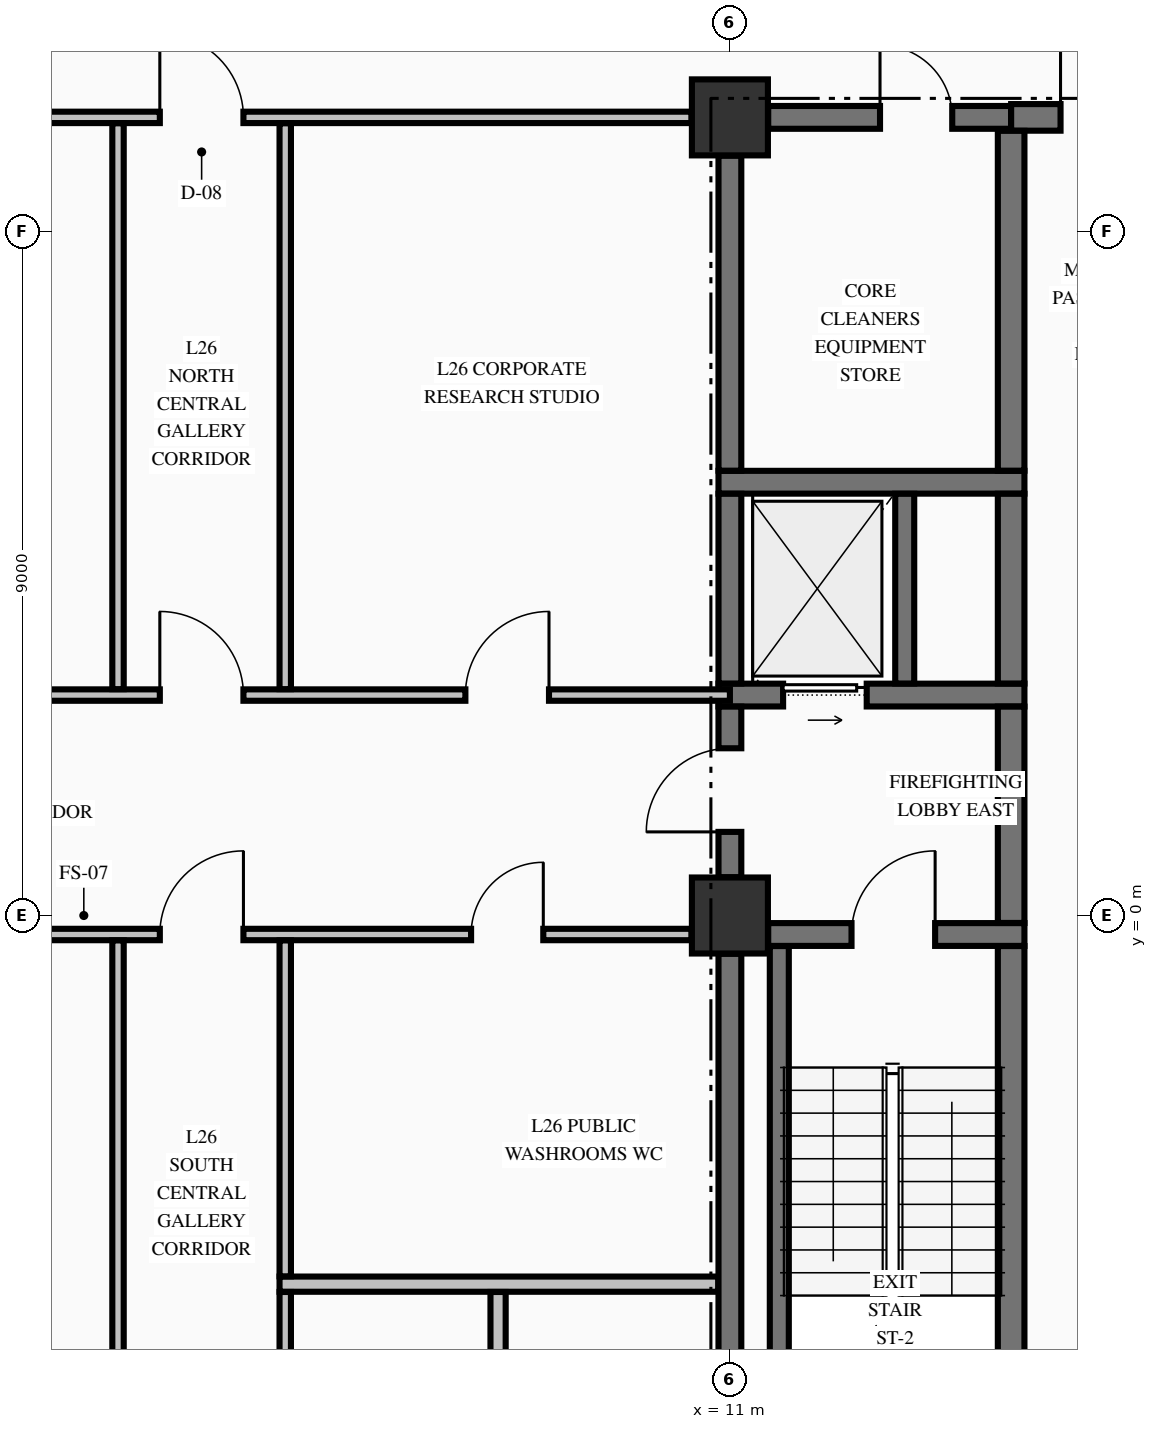
"""IFC4 building model, lengths in metres.
Left out: names, types, materials, properties, quantities, classifications, styles, units other than length and angle.
Written with IfcOpenShell. Run it as: python <this file> out.ifc"""

import sys

from ifc_helpers import new_model, si_unit, direction, frame, frame_2d, origin, origin_2d, place, context, subcontext, project, spatial, rectangle, extrude, element, fill, save


model = new_model("IFC4")
c1 = context("Model", 3, precision=1e-05, world=origin(), true_north=direction((0.0, 1.0)))
c2 = subcontext(c1, "Body", "Model", "MODEL_VIEW")
j1 = project(units=[si_unit("LENGTHUNIT", "METRE"), si_unit("PLANEANGLEUNIT", "RADIAN")], contexts=[c1])
p1 = place(None, origin())
s1 = spatial("IfcSite", under=j1, at=p1, CompositionType="ELEMENT")
p2 = place(p1, origin())
s2 = spatial("IfcBuilding", under=s1, at=p2, CompositionType="ELEMENT")
p3 = place(p2, frame((0.0, 0.0, 105.64)))
s3 = spatial("IfcBuildingStorey", under=s2, at=p3, CompositionType="ELEMENT", Elevation=105.64)
for number, where, z_axis, x_axis in (
    (1, (11.0, 0.0, -0.25), (0.0, 0.0, 1.0), (1.0, 0.0, 0.0)),
    (2, (11.0, 10.5, -0.25), (0.0, 0.0, 1.0), (1.0, 0.0, 0.0)),
):
    element("IfcColumn", number, at=place(p3, frame(where, z_axis=z_axis, x_axis=x_axis)), inside=s3, PredefinedType="COLUMN", context=c2, shape_type="SweptSolid", body=[
        extrude(rectangle(XDim=1.0, YDim=1.0, at=origin_2d()), origin(), (0.0, 0.0, 1.0), 3.57),
    ])
p4 = place(p3, frame((11.504, -0.25, 0.0), z_axis=(0.0, 0.0, 1.0), x_axis=(1.0, 0.0, 0.0)))
e3 = element("IfcWall", 3, at=p4, inside=s3, PredefinedType="SHEAR", context=c2, shape_type="SweptSolid", body=[
    extrude(rectangle(XDim=3.371, YDim=0.3, at=frame_2d((1.686, 0.0))), origin(), (0.0, 0.0, 1.0), 3.32),
])
p5 = place(p4, frame((1.096, 0.0, 0.0)))
e4 = element("IfcOpeningElement", 4, at=p5, cuts=e3, PredefinedType="OPENING", context=c2, shape_type="SweptSolid", body=[
    extrude(rectangle(XDim=1.1, YDim=2.15, at=frame_2d((0.55, 1.075))), frame((0.0, 0.16, 0.0), z_axis=(0.0, -1.0, 0.0), x_axis=(1.0, 0.0, 0.0)), (0.0, 0.0, 1.0), 0.32),
])
p6 = place(p3, frame((10.85, 2.9, 0.0), z_axis=(0.0, 0.0, 1.0), x_axis=(1.0, 0.0, 0.0)))
e5 = element("IfcWall", 5, at=p6, inside=s3, PredefinedType="SHEAR", context=c2, shape_type="SweptSolid", body=[
    extrude(rectangle(XDim=4.025, YDim=0.3, at=frame_2d((2.012, 0.0))), origin(), (0.0, 0.0, 1.0), 3.32),
])
p7 = place(p6, frame((0.85, 0.0, 0.0)))
e6 = element("IfcOpeningElement", 6, at=p7, cuts=e5, PredefinedType="OPENING", context=c2, shape_type="SweptSolid", body=[
    extrude(rectangle(XDim=1.1, YDim=2.2, at=frame_2d((0.55, 1.1))), frame((0.0, 0.16, 0.0), z_axis=(0.0, -1.0, 0.0), x_axis=(1.0, 0.0, 0.0)), (0.0, 0.0, 1.0), 0.32),
])
p8 = place(p3, frame((10.85, 5.7, 0.0), z_axis=(0.0, 0.0, 1.0), x_axis=(1.0, 0.0, 0.0)))
e7 = element("IfcWall", 7, at=p8, inside=s3, PredefinedType="SHEAR", context=c2, shape_type="SweptSolid", body=[
    extrude(rectangle(XDim=4.025, YDim=0.3, at=frame_2d((2.012, 0.0))), origin(), (0.0, 0.0, 1.0), 3.32),
])
p9 = place(p3, frame((11.504, 10.5, 0.0), z_axis=(0.0, 0.0, 1.0), x_axis=(1.0, 0.0, 0.0)))
e8 = element("IfcWall", 8, at=p9, inside=s3, PredefinedType="SHEAR", context=c2, shape_type="SweptSolid", body=[
    extrude(rectangle(XDim=3.196, YDim=0.3, at=frame_2d((1.598, 0.0))), origin(), (0.0, 0.0, 1.0), 3.32),
])
p10 = place(p9, frame((1.471, 0.0, 0.0)))
e9 = element("IfcOpeningElement", 9, at=p10, cuts=e8, PredefinedType="OPENING", context=c2, shape_type="SweptSolid", body=[
    extrude(rectangle(XDim=0.95, YDim=2.15, at=frame_2d((0.475, 1.075))), frame((0.0, 0.16, 0.0), z_axis=(0.0, -1.0, 0.0), x_axis=(1.0, 0.0, 0.0)), (0.0, 0.0, 1.0), 0.32),
])
p11 = place(p3, frame((14.7, 10.5, 0.0), z_axis=(0.0, 0.0, 1.0), x_axis=(1.0, 0.0, 0.0)))
e10 = element("IfcWall", 10, at=p11, inside=s3, PredefinedType="SHEAR", context=c2, shape_type="SweptSolid", body=[
    extrude(rectangle(XDim=4.796, YDim=0.35, at=frame_2d((2.398, 0.0))), origin(), (0.0, 0.0, 1.0), 3.32),
])
p12 = place(p11, frame((0.65, 0.0, 0.0)))
e11 = element("IfcOpeningElement", 11, at=p12, cuts=e10, PredefinedType="OPENING", context=c2, shape_type="SweptSolid", body=[
    extrude(rectangle(XDim=1.2, YDim=2.15, at=frame_2d((0.6, 1.075))), frame((0.0, 0.185, 0.0), z_axis=(0.0, -1.0, 0.0), x_axis=(1.0, 0.0, 0.0)), (0.0, 0.0, 1.0), 0.37),
])
p13 = place(p11, frame((3.25, 0.0, 0.0)))
e12 = element("IfcOpeningElement", 12, at=p13, cuts=e10, PredefinedType="OPENING", context=c2, shape_type="SweptSolid", body=[
    extrude(rectangle(XDim=0.9, YDim=2.15, at=frame_2d((0.45, 1.075))), frame((0.0, 0.185, 0.0), z_axis=(0.0, -1.0, 0.0), x_axis=(1.0, 0.0, 0.0)), (0.0, 0.0, 1.0), 0.37),
])
p14 = place(p3, frame((5.075, -4.85, 0.0), z_axis=(0.0, 0.0, 1.0), x_axis=(1.0, 0.0, 0.0)))
e13 = element("IfcWall", 13, at=p14, inside=s3, PredefinedType="PARTITIONING", context=c2, shape_type="SweptSolid", body=[
    extrude(rectangle(XDim=5.772, YDim=0.2, at=frame_2d((2.886, 0.0))), origin(), (0.0, 0.0, 1.0), 3.32),
])
p15 = place(p3, frame((-10.494, -0.25, 0.0), z_axis=(0.0, 0.0, 1.0), x_axis=(1.0, 0.0, 0.0)))
e14 = element("IfcWall", 14, at=p15, inside=s3, PredefinedType="PARTITIONING", context=c2, shape_type="SweptSolid", body=[
    extrude(rectangle(XDim=20.988, YDim=0.15, at=frame_2d((10.494, 0.0))), origin(), (0.0, 0.0, 1.0), 3.32),
])
p16 = place(p15, frame((13.994, 0.0, 0.0)))
e15 = element("IfcOpeningElement", 15, at=p16, cuts=e14, PredefinedType="OPENING", context=c2, shape_type="SweptSolid", body=[
    extrude(rectangle(XDim=1.1, YDim=2.15, at=frame_2d((0.55, 1.075))), frame((0.0, 0.085, 0.0), z_axis=(0.0, -1.0, 0.0), x_axis=(1.0, 0.0, 0.0)), (0.0, 0.0, 1.0), 0.17),
])
p17 = place(p15, frame((5.939, 0.0, 0.0)))
e16 = element("IfcOpeningElement", 16, at=p17, cuts=e14, PredefinedType="OPENING", context=c2, shape_type="SweptSolid", body=[
    extrude(rectangle(XDim=1.05, YDim=2.15, at=frame_2d((0.525, 1.075))), frame((0.0, 0.085, 0.0), z_axis=(0.0, -1.0, 0.0), x_axis=(1.0, 0.0, 0.0)), (0.0, 0.0, 1.0), 0.17),
])
p18 = place(p15, frame((18.089, 0.0, 0.0)))
e17 = element("IfcOpeningElement", 17, at=p18, cuts=e14, PredefinedType="OPENING", context=c2, shape_type="SweptSolid", body=[
    extrude(rectangle(XDim=0.95, YDim=2.15, at=frame_2d((0.475, 1.075))), frame((0.0, 0.085, 0.0), z_axis=(0.0, -1.0, 0.0), x_axis=(1.0, 0.0, 0.0)), (0.0, 0.0, 1.0), 0.17),
])
p19 = place(p3, frame((-11.0, 2.9, 0.0), z_axis=(0.0, 0.0, 1.0), x_axis=(1.0, 0.0, 0.0)))
e18 = element("IfcWall", 18, at=p19, inside=s3, PredefinedType="PARTITIONING", context=c2, shape_type="SweptSolid", body=[
    extrude(rectangle(XDim=22.0, YDim=0.15, at=frame_2d((11.0, 0.0))), origin(), (0.0, 0.0, 1.0), 3.32),
])
p20 = place(p19, frame((14.5, 0.0, 0.0)))
e19 = element("IfcOpeningElement", 19, at=p20, cuts=e18, PredefinedType="OPENING", context=c2, shape_type="SweptSolid", body=[
    extrude(rectangle(XDim=1.1, YDim=2.15, at=frame_2d((0.55, 1.075))), frame((0.0, 0.085, 0.0), z_axis=(0.0, -1.0, 0.0), x_axis=(1.0, 0.0, 0.0)), (0.0, 0.0, 1.0), 0.17),
])
p21 = place(p19, frame((6.445, 0.0, 0.0)))
e20 = element("IfcOpeningElement", 20, at=p21, cuts=e18, PredefinedType="OPENING", context=c2, shape_type="SweptSolid", body=[
    extrude(rectangle(XDim=1.05, YDim=2.15, at=frame_2d((0.525, 1.075))), frame((0.0, 0.085, 0.0), z_axis=(0.0, -1.0, 0.0), x_axis=(1.0, 0.0, 0.0)), (0.0, 0.0, 1.0), 0.17),
])
p22 = place(p19, frame((18.52, 0.0, 0.0)))
e21 = element("IfcOpeningElement", 21, at=p22, cuts=e18, PredefinedType="OPENING", context=c2, shape_type="SweptSolid", body=[
    extrude(rectangle(XDim=1.1, YDim=2.15, at=frame_2d((0.55, 1.075))), frame((0.0, 0.085, 0.0), z_axis=(0.0, -1.0, 0.0), x_axis=(1.0, 0.0, 0.0)), (0.0, 0.0, 1.0), 0.17),
])
p23 = place(p3, frame((-10.494, 10.5, 0.0), z_axis=(0.0, 0.0, 1.0), x_axis=(1.0, 0.0, 0.0)))
e22 = element("IfcWall", 22, at=p23, inside=s3, PredefinedType="PARTITIONING", context=c2, shape_type="SweptSolid", body=[
    extrude(rectangle(XDim=20.988, YDim=0.15, at=frame_2d((10.494, 0.0))), origin(), (0.0, 0.0, 1.0), 3.32),
])
p24 = place(p23, frame((13.994, 0.0, 0.0)))
e23 = element("IfcOpeningElement", 23, at=p24, cuts=e22, PredefinedType="OPENING", context=c2, shape_type="SweptSolid", body=[
    extrude(rectangle(XDim=1.1, YDim=2.15, at=frame_2d((0.55, 1.075))), frame((0.0, 0.085, 0.0), z_axis=(0.0, -1.0, 0.0), x_axis=(1.0, 0.0, 0.0)), (0.0, 0.0, 1.0), 0.17),
])
p25 = place(p3, frame((11.0, -9.446, 0.0), z_axis=(0.0, 0.0, 1.0), x_axis=(0.0, 1.0, 0.0)))
e24 = element("IfcWall", 24, at=p25, inside=s3, PredefinedType="SHEAR", context=c2, shape_type="SweptSolid", body=[
    extrude(rectangle(XDim=8.942, YDim=0.3, at=frame_2d((4.471, 0.0))), origin(), (0.0, 0.0, 1.0), 3.32),
])
p26 = place(p3, frame((11.0, 0.504, 0.0), z_axis=(0.0, 0.0, 1.0), x_axis=(0.0, 1.0, 0.0)))
e25 = element("IfcWall", 25, at=p26, inside=s3, PredefinedType="SHEAR", context=c2, shape_type="SweptSolid", body=[
    extrude(rectangle(XDim=2.244, YDim=0.3, at=frame_2d((1.122, 0.0))), origin(), (0.0, 0.0, 1.0), 3.32),
])
p27 = place(p26, frame((0.596, 0.0, 0.0)))
e26 = element("IfcOpeningElement", 26, at=p27, cuts=e25, PredefinedType="OPENING", context=c2, shape_type="SweptSolid", body=[
    extrude(rectangle(XDim=1.1, YDim=2.15, at=frame_2d((0.55, 1.075))), frame((0.0, 0.16, 0.0), z_axis=(0.0, -1.0, 0.0), x_axis=(1.0, 0.0, 0.0)), (0.0, 0.0, 1.0), 0.32),
])
p28 = place(p3, frame((11.0, 3.052, 0.0), z_axis=(0.0, 0.0, 1.0), x_axis=(0.0, 1.0, 0.0)))
e27 = element("IfcWall", 27, at=p28, inside=s3, PredefinedType="SHEAR", context=c2, shape_type="SweptSolid", body=[
    extrude(rectangle(XDim=2.496, YDim=0.3, at=frame_2d((1.248, 0.0))), origin(), (0.0, 0.0, 1.0), 3.32),
])
p29 = place(p3, frame((11.0, 5.852, 0.0), z_axis=(0.0, 0.0, 1.0), x_axis=(0.0, 1.0, 0.0)))
e28 = element("IfcWall", 28, at=p29, inside=s3, PredefinedType="SHEAR", context=c2, shape_type="SweptSolid", body=[
    extrude(rectangle(XDim=4.144, YDim=0.3, at=frame_2d((2.072, 0.0))), origin(), (0.0, 0.0, 1.0), 3.32),
])
p30 = place(p3, frame((11.65, -9.798, 0.0), z_axis=(0.0, 0.0, 1.0), x_axis=(0.0, 1.0, 0.0)))
e29 = element("IfcWall", 29, at=p30, inside=s3, PredefinedType="SOLIDWALL", context=c2, shape_type="SweptSolid", body=[
    extrude(rectangle(XDim=9.396, YDim=0.25, at=frame_2d((4.698, 0.0))), origin(), (0.0, 0.0, 1.0), 3.32),
])
p31 = place(p3, frame((13.3, 3.052, 0.0), z_axis=(0.0, 0.0, 1.0), x_axis=(0.0, 1.0, 0.0)))
e30 = element("IfcWall", 30, at=p31, inside=s3, PredefinedType="SOLIDWALL", context=c2, shape_type="SweptSolid", body=[
    extrude(rectangle(XDim=2.496, YDim=0.25, at=frame_2d((1.248, 0.0))), origin(), (0.0, 0.0, 1.0), 3.32),
])
p32 = place(p3, frame((14.7, -9.773, 0.0), z_axis=(0.0, 0.0, 1.0), x_axis=(0.0, 1.0, 0.0)))
e31 = element("IfcWall", 31, at=p32, inside=s3, PredefinedType="SHEAR", context=c2, shape_type="SweptSolid", body=[
    extrude(rectangle(XDim=9.371, YDim=0.35, at=frame_2d((4.686, 0.0))), origin(), (0.0, 0.0, 1.0), 3.32),
])
p33 = place(p3, frame((14.7, -0.098, 0.0), z_axis=(0.0, 0.0, 1.0), x_axis=(0.0, 1.0, 0.0)))
e32 = element("IfcWall", 32, at=p33, inside=s3, PredefinedType="SHEAR", context=c2, shape_type="SweptSolid", body=[
    extrude(rectangle(XDim=2.846, YDim=0.35, at=frame_2d((1.423, 0.0))), origin(), (0.0, 0.0, 1.0), 3.32),
])
p34 = place(p3, frame((14.7, 3.052, 0.0), z_axis=(0.0, 0.0, 1.0), x_axis=(0.0, 1.0, 0.0)))
e33 = element("IfcWall", 33, at=p34, inside=s3, PredefinedType="SHEAR", context=c2, shape_type="SweptSolid", body=[
    extrude(rectangle(XDim=2.496, YDim=0.35, at=frame_2d((1.248, 0.0))), origin(), (0.0, 0.0, 1.0), 3.32),
])
p35 = place(p3, frame((14.7, 5.852, 0.0), z_axis=(0.0, 0.0, 1.0), x_axis=(0.0, 1.0, 0.0)))
e34 = element("IfcWall", 34, at=p35, inside=s3, PredefinedType="SHEAR", context=c2, shape_type="SweptSolid", body=[
    extrude(rectangle(XDim=4.471, YDim=0.35, at=frame_2d((2.235, 0.0))), origin(), (0.0, 0.0, 1.0), 3.32),
])
p36 = place(p3, frame((2.95, -9.872, 0.0), z_axis=(0.0, 0.0, 1.0), x_axis=(0.0, 1.0, 0.0)))
e35 = element("IfcWall", 35, at=p36, inside=s3, PredefinedType="PARTITIONING", context=c2, shape_type="SweptSolid", body=[
    extrude(rectangle(XDim=9.544, YDim=0.15, at=frame_2d((4.772, 0.0))), origin(), (0.0, 0.0, 1.0), 3.32),
])
p37 = place(p3, frame((2.95, 2.978, 0.0), z_axis=(0.0, 0.0, 1.0), x_axis=(0.0, 1.0, 0.0)))
e36 = element("IfcWall", 36, at=p37, inside=s3, PredefinedType="PARTITIONING", context=c2, shape_type="SweptSolid", body=[
    extrude(rectangle(XDim=7.444, YDim=0.15, at=frame_2d((3.722, 0.0))), origin(), (0.0, 0.0, 1.0), 3.32),
])
p38 = place(p3, frame((5.15, -9.872, 0.0), z_axis=(0.0, 0.0, 1.0), x_axis=(0.0, 1.0, 0.0)))
e37 = element("IfcWall", 37, at=p38, inside=s3, PredefinedType="PARTITIONING", context=c2, shape_type="SweptSolid", body=[
    extrude(rectangle(XDim=4.919, YDim=0.15, at=frame_2d((2.459, 0.0))), origin(), (0.0, 0.0, 1.0), 3.32),
])
p39 = place(p38, frame((1.997, 0.0, 0.0)))
e38 = element("IfcOpeningElement", 38, at=p39, cuts=e37, PredefinedType="OPENING", context=c2, shape_type="SweptSolid", body=[
    extrude(rectangle(XDim=0.95, YDim=2.15, at=frame_2d((0.475, 1.075))), frame((0.0, 0.085, 0.0), z_axis=(0.0, -1.0, 0.0), x_axis=(1.0, 0.0, 0.0)), (0.0, 0.0, 1.0), 0.17),
])
p40 = place(p3, frame((5.15, -4.747, 0.0), z_axis=(0.0, 0.0, 1.0), x_axis=(0.0, 1.0, 0.0)))
e39 = element("IfcWall", 39, at=p40, inside=s3, PredefinedType="PARTITIONING", context=c2, shape_type="SweptSolid", body=[
    extrude(rectangle(XDim=4.419, YDim=0.15, at=frame_2d((2.209, 0.0))), origin(), (0.0, 0.0, 1.0), 3.32),
])
p41 = place(p3, frame((5.15, 2.978, 0.0), z_axis=(0.0, 0.0, 1.0), x_axis=(0.0, 1.0, 0.0)))
e40 = element("IfcWall", 40, at=p41, inside=s3, PredefinedType="PARTITIONING", context=c2, shape_type="SweptSolid", body=[
    extrude(rectangle(XDim=7.444, YDim=0.15, at=frame_2d((3.722, 0.0))), origin(), (0.0, 0.0, 1.0), 3.32),
])
p42 = place(p3, frame((7.95, -9.872, 0.0), z_axis=(0.0, 0.0, 1.0), x_axis=(0.0, 1.0, 0.0)))
e41 = element("IfcWall", 41, at=p42, inside=s3, PredefinedType="PARTITIONING", context=c2, shape_type="SweptSolid", body=[
    extrude(rectangle(XDim=4.919, YDim=0.2, at=frame_2d((2.459, 0.0))), origin(), (0.0, 0.0, 1.0), 3.32),
])
p43 = place(p5, origin())
e42 = element("IfcDoor", 42, at=p43, inside=s3, OperationType="SINGLE_SWING_RIGHT", PredefinedType="DOOR", context=c2, shape_type="SweptSolid", body=[
    extrude(rectangle(XDim=1.1, YDim=2.15, at=frame_2d((0.55, 1.075))), frame((0.0, 0.025, 0.0), z_axis=(0.0, -1.0, 0.0), x_axis=(1.0, 0.0, 0.0)), (0.0, 0.0, 1.0), 0.05),
])
fill(e4, e42)
p44 = place(p27, origin())
e43 = element("IfcDoor", 43, at=p44, inside=s3, OperationType="SINGLE_SWING_LEFT", PredefinedType="DOOR", context=c2, shape_type="SweptSolid", body=[
    extrude(rectangle(XDim=1.1, YDim=2.15, at=frame_2d((0.55, 1.075))), frame((0.0, 0.025, 0.0), z_axis=(0.0, -1.0, 0.0), x_axis=(1.0, 0.0, 0.0)), (0.0, 0.0, 1.0), 0.05),
])
fill(e26, e43)
p45 = place(p7, origin())
e44 = element("IfcDoor", 44, at=p45, inside=s3, OperationType="SLIDING_TO_RIGHT", PredefinedType="DOOR", context=c2, shape_type="SweptSolid", body=[
    extrude(rectangle(XDim=1.1, YDim=2.2, at=frame_2d((0.55, 1.1))), frame((0.0, 0.025, 0.0), z_axis=(0.0, -1.0, 0.0), x_axis=(1.0, 0.0, 0.0)), (0.0, 0.0, 1.0), 0.05),
])
fill(e6, e44)
p46 = place(p10, origin())
e45 = element("IfcDoor", 45, at=p46, inside=s3, OperationType="SINGLE_SWING_LEFT", PredefinedType="DOOR", context=c2, shape_type="SweptSolid", body=[
    extrude(rectangle(XDim=0.95, YDim=2.15, at=frame_2d((0.475, 1.075))), frame((0.0, 0.025, 0.0), z_axis=(0.0, -1.0, 0.0), x_axis=(1.0, 0.0, 0.0)), (0.0, 0.0, 1.0), 0.05),
])
fill(e9, e45)
p47 = place(p12, origin())
e46 = element("IfcDoor", 46, at=p47, inside=s3, OperationType="SINGLE_SWING_LEFT", PredefinedType="DOOR", context=c2, shape_type="SweptSolid", body=[
    extrude(rectangle(XDim=1.2, YDim=2.15, at=frame_2d((0.6, 1.075))), frame((0.0, 0.025, 0.0), z_axis=(0.0, -1.0, 0.0), x_axis=(1.0, 0.0, 0.0)), (0.0, 0.0, 1.0), 0.05),
])
fill(e11, e46)
p48 = place(p24, origin())
e47 = element("IfcDoor", 47, at=p48, inside=s3, OperationType="SINGLE_SWING_LEFT", PredefinedType="DOOR", context=c2, shape_type="SweptSolid", body=[
    extrude(rectangle(XDim=1.1, YDim=2.15, at=frame_2d((0.55, 1.075))), frame((0.0, 0.025, 0.0), z_axis=(0.0, -1.0, 0.0), x_axis=(1.0, 0.0, 0.0)), (0.0, 0.0, 1.0), 0.05),
])
fill(e23, e47)
p49 = place(p20, origin())
e48 = element("IfcDoor", 48, at=p49, inside=s3, OperationType="SINGLE_SWING_LEFT", PredefinedType="DOOR", context=c2, shape_type="SweptSolid", body=[
    extrude(rectangle(XDim=1.1, YDim=2.15, at=frame_2d((0.55, 1.075))), frame((0.0, 0.025, 0.0), z_axis=(0.0, -1.0, 0.0), x_axis=(1.0, 0.0, 0.0)), (0.0, 0.0, 1.0), 0.05),
])
fill(e19, e48)
p50 = place(p16, origin())
e49 = element("IfcDoor", 49, at=p50, inside=s3, OperationType="SINGLE_SWING_RIGHT", PredefinedType="DOOR", context=c2, shape_type="SweptSolid", body=[
    extrude(rectangle(XDim=1.1, YDim=2.15, at=frame_2d((0.55, 1.075))), frame((0.0, 0.025, 0.0), z_axis=(0.0, -1.0, 0.0), x_axis=(1.0, 0.0, 0.0)), (0.0, 0.0, 1.0), 0.05),
])
fill(e15, e49)
p51 = place(p22, origin())
e50 = element("IfcDoor", 50, at=p51, inside=s3, OperationType="SINGLE_SWING_RIGHT", PredefinedType="DOOR", context=c2, shape_type="SweptSolid", body=[
    extrude(rectangle(XDim=1.1, YDim=2.15, at=frame_2d((0.55, 1.075))), frame((0.0, 0.025, 0.0), z_axis=(0.0, -1.0, 0.0), x_axis=(1.0, 0.0, 0.0)), (0.0, 0.0, 1.0), 0.05),
])
fill(e21, e50)
p52 = place(p18, origin())
e51 = element("IfcDoor", 51, at=p52, inside=s3, OperationType="SINGLE_SWING_RIGHT", PredefinedType="DOOR", context=c2, shape_type="SweptSolid", body=[
    extrude(rectangle(XDim=0.95, YDim=2.15, at=frame_2d((0.475, 1.075))), frame((0.0, 0.025, 0.0), z_axis=(0.0, -1.0, 0.0), x_axis=(1.0, 0.0, 0.0)), (0.0, 0.0, 1.0), 0.05),
])
fill(e17, e51)
save(model, sys.argv[1])
